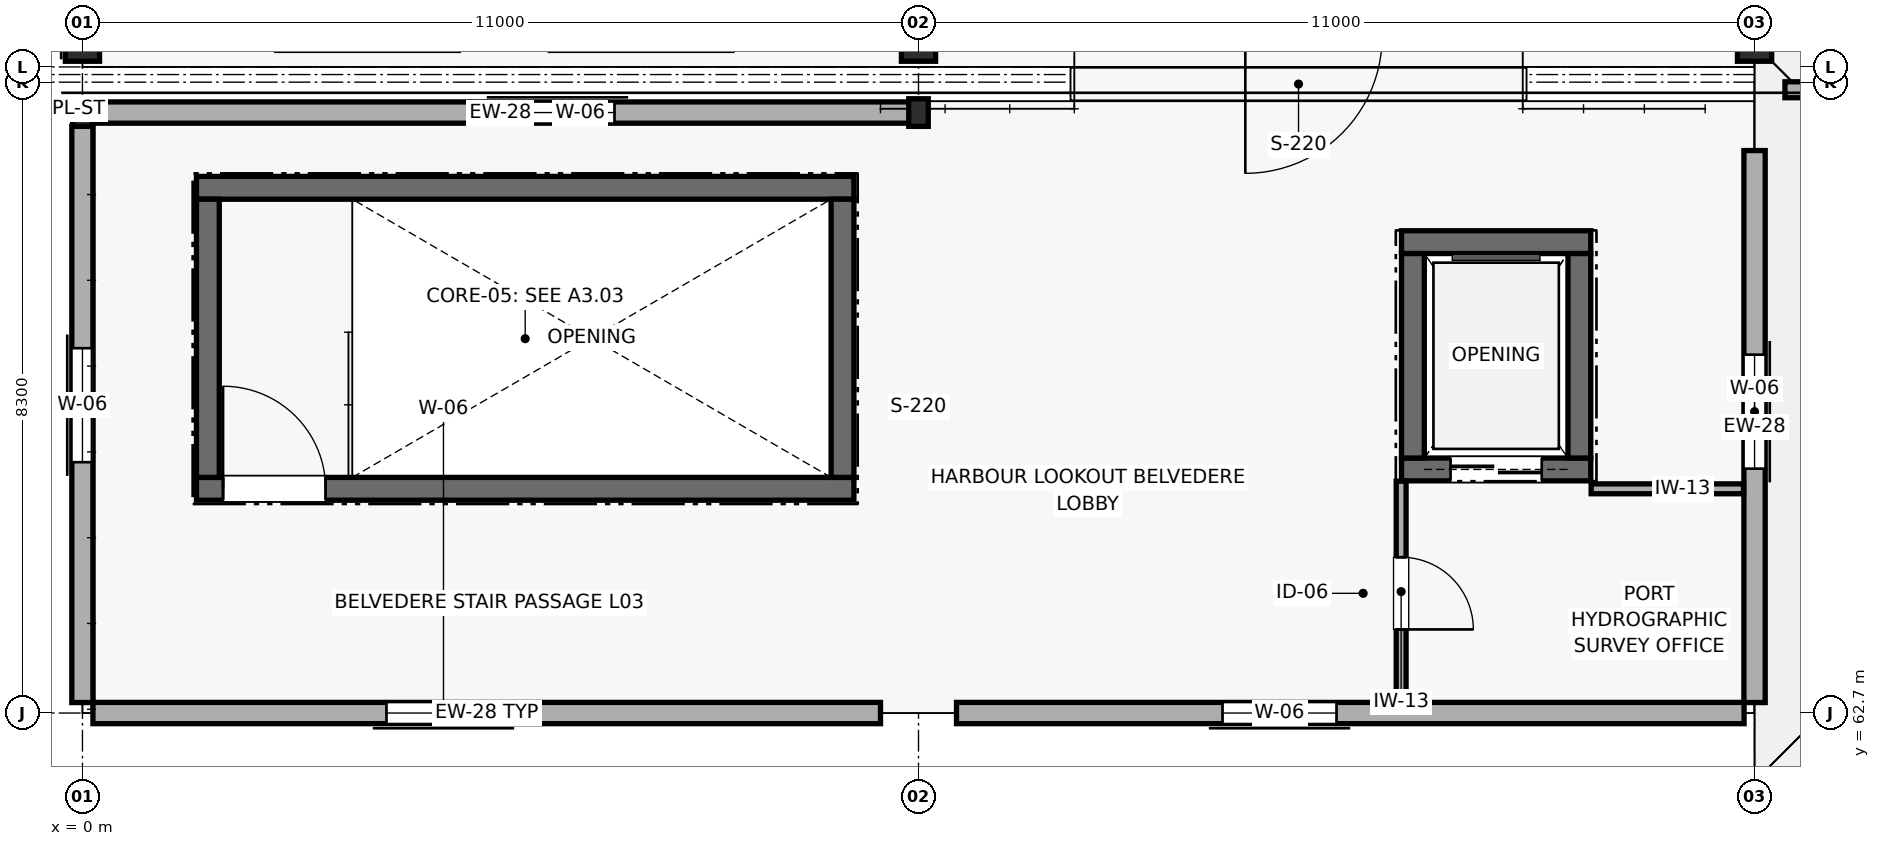
"""IFC4 building model, lengths in metres.
Left out: names, types, materials, properties, quantities, classifications, styles, units other than length and angle.
Written with IfcOpenShell. Run it as: python <this file> out.ifc"""

import sys

from ifc_helpers import new_model, si_unit, direction, frame, frame_2d, origin, origin_2d, place, context, subcontext, project, spatial, rectangle, i_section, extrude, element, fill, save


model = new_model("IFC4")
c1 = context("Model", 3, precision=1e-05, world=origin(), true_north=direction((0.0, 1.0)))
c2 = subcontext(c1, "Body", "Model", "MODEL_VIEW")
j1 = project(units=[si_unit("LENGTHUNIT", "METRE"), si_unit("PLANEANGLEUNIT", "RADIAN")], contexts=[c1])
p1 = place(None, origin())
s1 = spatial("IfcSite", under=j1, at=p1, CompositionType="ELEMENT")
p2 = place(p1, origin())
s2 = spatial("IfcBuilding", under=s1, at=p2, CompositionType="ELEMENT")
p3 = place(p2, frame((0.0, 0.0, 14.1)))
s3 = spatial("IfcBuildingStorey", under=s2, at=p3, CompositionType="ELEMENT", Elevation=14.1)
for number, where, z_axis, x_axis in (
    (1, (0.0, 70.6, 0.0), (0.0, 0.0, 1.0), (1.0, 0.0, 0.0)),
    (2, (11.0, 70.6, 0.0), (0.0, 0.0, 1.0), (1.0, 0.0, 0.0)),
):
    element("IfcColumn", number, at=place(p3, frame(where, z_axis=z_axis, x_axis=x_axis)), inside=s3, PredefinedType="COLUMN", context=c2, shape_type="SweptSolid", body=[
        extrude(i_section(OverallWidth=0.257, OverallDepth=0.363, WebThickness=0.013, FlangeThickness=0.022, FilletRadius=0.015, at=origin_2d()), origin(), (0.0, 0.0, 1.0), 4.2),
    ])
for number, where, z_axis, x_axis in (
    (3, (0.0, 71.6, 0.0), (0.0, 0.0, 1.0), (1.0, 0.0, 0.0)),
    (4, (11.0, 71.6, 0.0), (0.0, 0.0, 1.0), (1.0, 0.0, 0.0)),
    (5, (22.0, 71.6, 0.0), (0.0, 0.0, 1.0), (1.0, 0.0, 0.0)),
):
    element("IfcColumn", number, at=place(p3, frame(where, z_axis=z_axis, x_axis=x_axis)), inside=s3, PredefinedType="COLUMN", context=c2, shape_type="SweptSolid", body=[
        extrude(rectangle(XDim=0.45, YDim=0.65, at=origin_2d()), origin(), (0.0, 0.0, 1.0), 4.2),
    ])
p4 = place(p3, frame((10.996, 70.6, 0.0), z_axis=(0.0, 0.0, 1.0), x_axis=(-1.0, 0.0, 0.0)))
e6 = element("IfcWall", 6, at=p4, inside=s3, PredefinedType="SOLIDWALL", context=c2, shape_type="SweptSolid", body=[
    extrude(rectangle(XDim=10.991, YDim=0.28, at=frame_2d((5.496, 0.0))), origin(), (0.0, 0.0, 1.0), 3.302),
])
p5 = place(p4, frame((3.996, 0.0, 1.0)))
e7 = element("IfcOpeningElement", 7, at=p5, cuts=e6, PredefinedType="OPENING", context=c2, shape_type="SweptSolid", body=[
    extrude(rectangle(XDim=1.5, YDim=1.8, at=frame_2d((0.75, 0.9))), frame((0.0, 0.15, 0.0), z_axis=(0.0, -1.0, 0.0), x_axis=(1.0, 0.0, 0.0)), (0.0, 0.0, 1.0), 0.3),
])
p6 = place(p3, frame((0.138, 62.7, 0.0), z_axis=(0.0, 0.0, 1.0), x_axis=(1.0, 0.0, 0.0)))
e8 = element("IfcWall", 8, at=p6, inside=s3, PredefinedType="SOLIDWALL", context=c2, shape_type="SweptSolid", body=[
    extrude(rectangle(XDim=10.362, YDim=0.28, at=frame_2d((5.181, 0.0))), origin(), (0.0, 0.0, 1.0), 3.99),
])
p7 = place(p6, frame((3.862, 0.0, 1.0)))
e9 = element("IfcOpeningElement", 9, at=p7, cuts=e8, PredefinedType="OPENING", context=c2, shape_type="SweptSolid", body=[
    extrude(rectangle(XDim=1.5, YDim=1.8, at=frame_2d((0.75, 0.9))), frame((0.0, 0.15, 0.0), z_axis=(0.0, -1.0, 0.0), x_axis=(1.0, 0.0, 0.0)), (0.0, 0.0, 1.0), 0.3),
])
p8 = place(p3, frame((11.5, 62.7, 0.0), z_axis=(0.0, 0.0, 1.0), x_axis=(1.0, 0.0, 0.0)))
e10 = element("IfcWall", 10, at=p8, inside=s3, PredefinedType="SOLIDWALL", context=c2, shape_type="SweptSolid", body=[
    extrude(rectangle(XDim=10.362, YDim=0.28, at=frame_2d((5.181, 0.0))), origin(), (0.0, 0.0, 1.0), 3.99),
])
p9 = place(p8, frame((3.5, 0.0, 1.0)))
e11 = element("IfcOpeningElement", 11, at=p9, cuts=e10, PredefinedType="OPENING", context=c2, shape_type="SweptSolid", body=[
    extrude(rectangle(XDim=1.5, YDim=1.8, at=frame_2d((0.75, 0.9))), frame((0.0, 0.15, 0.0), z_axis=(0.0, -1.0, 0.0), x_axis=(1.0, 0.0, 0.0)), (0.0, 0.0, 1.0), 0.3),
])
p10 = place(p3, frame((0.0, 70.42, 0.0), z_axis=(0.0, 0.0, 1.0), x_axis=(0.0, -1.0, 0.0)))
e12 = element("IfcWall", 12, at=p10, inside=s3, PredefinedType="SOLIDWALL", context=c2, shape_type="SweptSolid", body=[
    extrude(rectangle(XDim=7.583, YDim=0.28, at=frame_2d((3.791, 0.0))), origin(), (0.0, 0.0, 1.0), 3.99),
])
p11 = place(p10, frame((2.92, 0.0, 1.0)))
e13 = element("IfcOpeningElement", 13, at=p11, cuts=e12, PredefinedType="OPENING", context=c2, shape_type="SweptSolid", body=[
    extrude(rectangle(XDim=1.5, YDim=1.8, at=frame_2d((0.75, 0.9))), frame((0.0, 0.15, 0.0), z_axis=(0.0, -1.0, 0.0), x_axis=(1.0, 0.0, 0.0)), (0.0, 0.0, 1.0), 0.3),
])
p12 = place(p3, frame((22.0, 62.838, 0.0), z_axis=(0.0, 0.0, 1.0), x_axis=(0.0, 1.0, 0.0)))
e14 = element("IfcWall", 14, at=p12, inside=s3, PredefinedType="SOLIDWALL", context=c2, shape_type="SweptSolid", body=[
    extrude(rectangle(XDim=7.262, YDim=0.28, at=frame_2d((3.631, 0.0))), origin(), (0.0, 0.0, 1.0), 3.99),
])
p13 = place(p12, frame((3.077, 0.0, 1.0)))
e15 = element("IfcOpeningElement", 15, at=p13, cuts=e14, PredefinedType="OPENING", context=c2, shape_type="SweptSolid", body=[
    extrude(rectangle(XDim=1.5, YDim=1.8, at=frame_2d((0.75, 0.9))), frame((0.0, 0.15, 0.0), z_axis=(0.0, -1.0, 0.0), x_axis=(1.0, 0.0, 0.0)), (0.0, 0.0, 1.0), 0.3),
])
p14 = place(p3, frame((22.4, 70.9, 0.0), z_axis=(0.0, 0.0, 1.0), x_axis=(1.0, 0.0, 0.0)))
e16 = element("IfcWall", 16, at=p14, inside=s3, PredefinedType="PARAPET", context=c2, shape_type="SweptSolid", body=[
    extrude(rectangle(XDim=32.4, YDim=0.21, at=frame_2d((16.2, 0.0))), origin(), (0.0, 0.0, 1.0), 1.15),
])
p15 = place(p3, frame((1.5, 65.65, 0.0), z_axis=(0.0, 0.0, 1.0), x_axis=(1.0, 0.0, 0.0)))
e17 = element("IfcWall", 17, at=p15, inside=s3, PredefinedType="SHEAR", context=c2, shape_type="SweptSolid", body=[
    extrude(rectangle(XDim=8.65, YDim=0.3, at=frame_2d((4.325, 0.0))), origin(), (0.0, 0.0, 1.0), 3.99),
])
p16 = place(p15, frame((0.35, 0.0, 0.0)))
e18 = element("IfcOpeningElement", 18, at=p16, cuts=e17, PredefinedType="OPENING", context=c2, shape_type="SweptSolid", body=[
    extrude(rectangle(XDim=1.35, YDim=2.2, at=frame_2d((0.675, 1.1))), frame((0.0, 0.16, 0.0), z_axis=(0.0, -1.0, 0.0), x_axis=(1.0, 0.0, 0.0)), (0.0, 0.0, 1.0), 0.32),
])
p17 = place(p3, frame((10.15, 69.61, 0.0), z_axis=(0.0, 0.0, 1.0), x_axis=(-1.0, 0.0, 0.0)))
e19 = element("IfcWall", 19, at=p17, inside=s3, PredefinedType="SHEAR", context=c2, shape_type="SweptSolid", body=[
    extrude(rectangle(XDim=8.65, YDim=0.3, at=frame_2d((4.325, 0.0))), origin(), (0.0, 0.0, 1.0), 3.99),
])
for number, where, z_axis, x_axis in (
    (20, (1.65, 69.46, 0.0), (0.0, 0.0, 1.0), (0.0, -1.0, 0.0)),
    (21, (10.0, 65.8, 0.0), (0.0, 0.0, 1.0), (0.0, 1.0, 0.0)),
):
    element("IfcWall", number, at=place(p3, frame(where, z_axis=z_axis, x_axis=x_axis)), inside=s3, PredefinedType="SHEAR", context=c2, shape_type="SweptSolid", body=[
        extrude(rectangle(XDim=3.66, YDim=0.3, at=frame_2d((1.83, 0.0))), origin(), (0.0, 0.0, 1.0), 3.99),
    ])
p18 = place(p3, frame((17.355, 65.905, 0.0), z_axis=(0.0, 0.0, 1.0), x_axis=(1.0, 0.0, 0.0)))
e22 = element("IfcWall", 22, at=p18, inside=s3, PredefinedType="SHEAR", context=c2, shape_type="SweptSolid", body=[
    extrude(rectangle(XDim=2.49, YDim=0.3, at=frame_2d((1.245, 0.0))), origin(), (0.0, 0.0, 1.0), 3.99),
])
p19 = place(p18, frame((0.645, 0.0, 0.0)))
e23 = element("IfcOpeningElement", 23, at=p19, cuts=e22, PredefinedType="OPENING", context=c2, shape_type="SweptSolid", body=[
    extrude(rectangle(XDim=1.2, YDim=2.15, at=frame_2d((0.6, 1.075))), frame((0.0, 0.16, 0.0), z_axis=(0.0, -1.0, 0.0), x_axis=(1.0, 0.0, 0.0)), (0.0, 0.0, 1.0), 0.32),
])
p20 = place(p3, frame((19.845, 68.895, 0.0), z_axis=(0.0, 0.0, 1.0), x_axis=(-1.0, 0.0, 0.0)))
e24 = element("IfcWall", 24, at=p20, inside=s3, PredefinedType="SHEAR", context=c2, shape_type="SweptSolid", body=[
    extrude(rectangle(XDim=2.49, YDim=0.3, at=frame_2d((1.245, 0.0))), origin(), (0.0, 0.0, 1.0), 3.99),
])
for number, where, z_axis, x_axis in (
    (25, (17.505, 68.745, 0.0), (0.0, 0.0, 1.0), (0.0, -1.0, 0.0)),
    (26, (19.695, 66.055, 0.0), (0.0, 0.0, 1.0), (0.0, 1.0, 0.0)),
):
    element("IfcWall", number, at=place(p3, frame(where, z_axis=z_axis, x_axis=x_axis)), inside=s3, PredefinedType="SHEAR", context=c2, shape_type="SweptSolid", body=[
        extrude(rectangle(XDim=2.69, YDim=0.3, at=frame_2d((1.345, 0.0))), origin(), (0.0, 0.0, 1.0), 3.99),
    ])
p21 = place(p3, frame((19.85, 65.65, 0.0), z_axis=(0.0, 0.0, 1.0), x_axis=(1.0, 0.0, 0.0)))
e27 = element("IfcWall", 27, at=p21, inside=s3, PredefinedType="PARTITIONING", context=c2, shape_type="SweptSolid", body=[
    extrude(rectangle(XDim=2.005, YDim=0.13, at=frame_2d((1.002, 0.0))), origin(), (0.0, 0.0, 1.0), 3.99),
])
p22 = place(p3, frame((17.35, 62.845, 0.0), z_axis=(0.0, 0.0, 1.0), x_axis=(0.0, 1.0, 0.0)))
e28 = element("IfcWall", 28, at=p22, inside=s3, PredefinedType="PARTITIONING", context=c2, shape_type="SweptSolid", body=[
    extrude(rectangle(XDim=2.905, YDim=0.13, at=frame_2d((1.453, 0.0))), origin(), (0.0, 0.0, 1.0), 3.99),
])
p23 = place(p22, frame((0.955, 0.0, 0.0)))
e29 = element("IfcOpeningElement", 29, at=p23, cuts=e28, PredefinedType="OPENING", context=c2, shape_type="SweptSolid", body=[
    extrude(rectangle(XDim=0.95, YDim=2.15, at=frame_2d((0.475, 1.075))), frame((0.0, 0.075, 0.0), z_axis=(0.0, -1.0, 0.0), x_axis=(1.0, 0.0, 0.0)), (0.0, 0.0, 1.0), 0.15),
])
p24 = place(p5, origin())
e30 = element("IfcWindow", 30, at=p24, inside=s3, PartitioningType="SINGLE_PANEL", PredefinedType="WINDOW", context=c2, shape_type="SweptSolid", body=[
    extrude(rectangle(XDim=1.5, YDim=1.8, at=frame_2d((0.75, 0.9))), frame((0.0, 0.03, 0.0), z_axis=(0.0, -1.0, 0.0), x_axis=(1.0, 0.0, 0.0)), (0.0, 0.0, 1.0), 0.06),
])
fill(e7, e30)
p25 = place(p7, origin())
e31 = element("IfcWindow", 31, at=p25, inside=s3, PartitioningType="SINGLE_PANEL", PredefinedType="WINDOW", context=c2, shape_type="SweptSolid", body=[
    extrude(rectangle(XDim=1.5, YDim=1.8, at=frame_2d((0.75, 0.9))), frame((0.0, 0.03, 0.0), z_axis=(0.0, -1.0, 0.0), x_axis=(1.0, 0.0, 0.0)), (0.0, 0.0, 1.0), 0.06),
])
fill(e9, e31)
p26 = place(p9, origin())
e32 = element("IfcWindow", 32, at=p26, inside=s3, PartitioningType="SINGLE_PANEL", PredefinedType="WINDOW", context=c2, shape_type="SweptSolid", body=[
    extrude(rectangle(XDim=1.5, YDim=1.8, at=frame_2d((0.75, 0.9))), frame((0.0, 0.03, 0.0), z_axis=(0.0, -1.0, 0.0), x_axis=(1.0, 0.0, 0.0)), (0.0, 0.0, 1.0), 0.06),
])
fill(e11, e32)
p27 = place(p11, origin())
e33 = element("IfcWindow", 33, at=p27, inside=s3, PartitioningType="SINGLE_PANEL", PredefinedType="WINDOW", context=c2, shape_type="SweptSolid", body=[
    extrude(rectangle(XDim=1.5, YDim=1.8, at=frame_2d((0.75, 0.9))), frame((0.0, 0.03, 0.0), z_axis=(0.0, -1.0, 0.0), x_axis=(1.0, 0.0, 0.0)), (0.0, 0.0, 1.0), 0.06),
])
fill(e13, e33)
p28 = place(p13, origin())
e34 = element("IfcWindow", 34, at=p28, inside=s3, PartitioningType="SINGLE_PANEL", PredefinedType="WINDOW", context=c2, shape_type="SweptSolid", body=[
    extrude(rectangle(XDim=1.5, YDim=1.8, at=frame_2d((0.75, 0.9))), frame((0.0, 0.03, 0.0), z_axis=(0.0, -1.0, 0.0), x_axis=(1.0, 0.0, 0.0)), (0.0, 0.0, 1.0), 0.06),
])
fill(e15, e34)
p29 = place(p16, origin())
e35 = element("IfcDoor", 35, at=p29, inside=s3, OperationType="SINGLE_SWING_LEFT", PredefinedType="DOOR", context=c2, shape_type="SweptSolid", body=[
    extrude(rectangle(XDim=1.35, YDim=2.2, at=frame_2d((0.675, 1.1))), frame((0.0, 0.025, 0.0), z_axis=(0.0, -1.0, 0.0), x_axis=(1.0, 0.0, 0.0)), (0.0, 0.0, 1.0), 0.05),
])
fill(e18, e35)
p30 = place(p19, frame((1.2, 0.0, 0.0), z_axis=(0.0, 0.0, 1.0), x_axis=(-1.0, 0.0, 0.0)))
e36 = element("IfcDoor", 36, at=p30, inside=s3, OperationType="DOUBLE_DOOR_SLIDING", PredefinedType="DOOR", context=c2, shape_type="SweptSolid", body=[
    extrude(rectangle(XDim=1.2, YDim=2.15, at=frame_2d((0.6, 1.075))), frame((0.0, 0.025, 0.0), z_axis=(0.0, -1.0, 0.0), x_axis=(1.0, 0.0, 0.0)), (0.0, 0.0, 1.0), 0.05),
])
fill(e23, e36)
p31 = place(p23, frame((0.95, 0.0, 0.0), z_axis=(0.0, 0.0, 1.0), x_axis=(-1.0, 0.0, 0.0)))
e37 = element("IfcDoor", 37, at=p31, inside=s3, OperationType="SINGLE_SWING_RIGHT", PredefinedType="DOOR", context=c2, shape_type="SweptSolid", body=[
    extrude(rectangle(XDim=0.95, YDim=2.15, at=frame_2d((0.475, 1.075))), frame((0.0, 0.025, 0.0), z_axis=(0.0, -1.0, 0.0), x_axis=(1.0, 0.0, 0.0)), (0.0, 0.0, 1.0), 0.05),
])
fill(e29, e37)
save(model, sys.argv[1])
